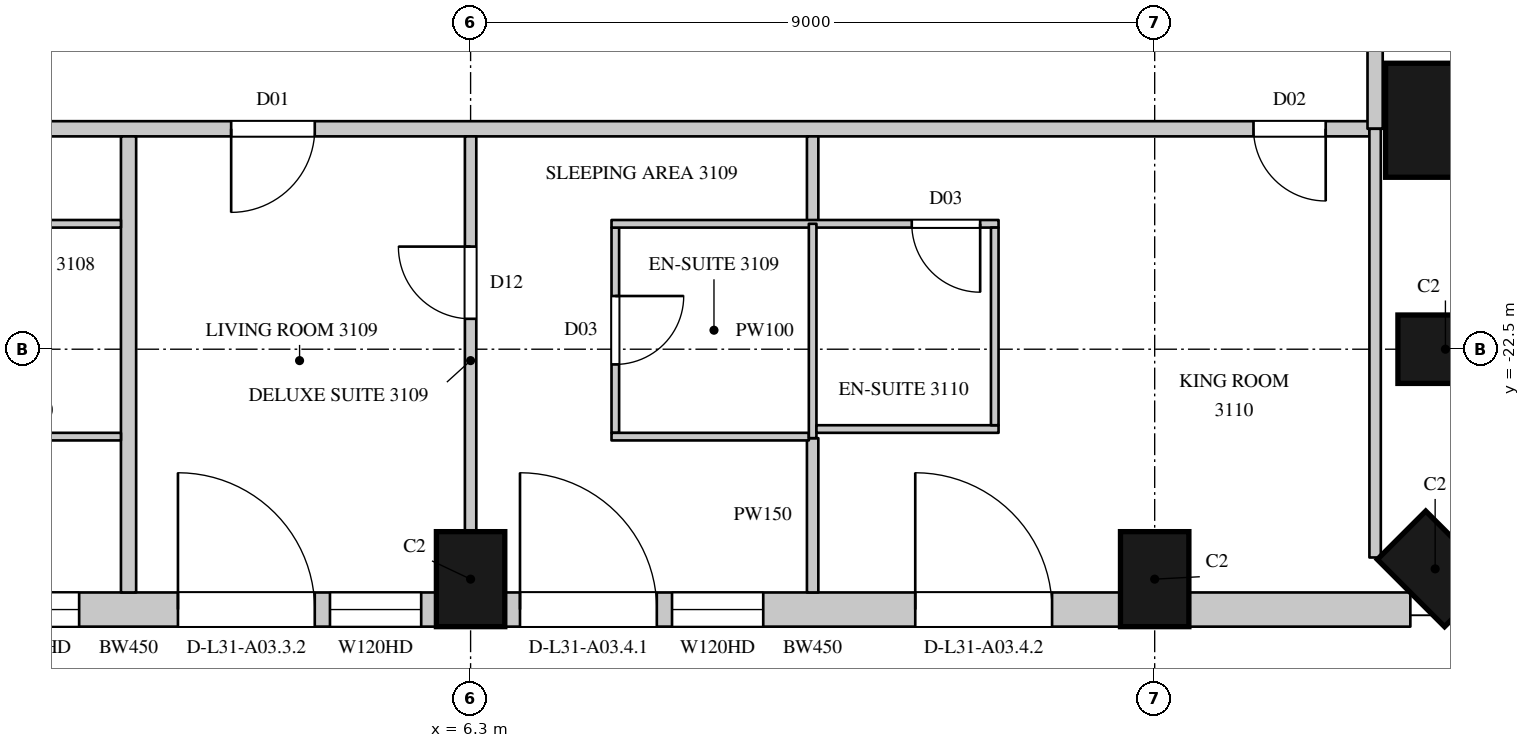
"""IFC4 building model, lengths in metres.
Left out: names, types, materials, properties, quantities, classifications, styles, units other than length and angle.
Written with IfcOpenShell. Run it as: python <this file> out.ifc"""

import sys

from ifc_helpers import new_model, si_unit, direction, frame, frame_2d, origin, origin_2d, place, context, subcontext, project, spatial, rectangle, circle, extrude, element, fill, save


model = new_model("IFC4")
c1 = context("Model", 3, precision=1e-05, world=origin(), true_north=direction((0.0, 1.0)))
c2 = subcontext(c1, "Body", "Model", "MODEL_VIEW")
j1 = project(units=[si_unit("LENGTHUNIT", "METRE"), si_unit("PLANEANGLEUNIT", "RADIAN")], contexts=[c1])
p1 = place(None, origin())
s1 = spatial("IfcSite", under=j1, at=p1, CompositionType="ELEMENT")
p2 = place(p1, origin())
s2 = spatial("IfcBuilding", under=s1, at=p2, CompositionType="ELEMENT")
p3 = place(p2, frame((0.0, 0.0, 141.9)))
s3 = spatial("IfcBuildingStorey", under=s2, at=p3, CompositionType="ELEMENT", Elevation=141.9)
for number, where, z_axis, x_axis in (
    (1, (6.3, -25.525, 0.0), (0.0, 0.0, 1.0), (1.0, 0.0, 0.0)),
    (2, (15.3, -25.525, 0.0), (0.0, 0.0, 1.0), (1.0, 0.0, 0.0)),
    (3, (18.99, -25.39, 0.0), (0.0, 0.0, 1.0), (0.707, 0.707, 0.0)),
    (4, (19.125, -22.5, 0.0), (0.0, 0.0, 1.0), (0.0, 1.0, 0.0)),
):
    element("IfcColumn", number, at=place(p3, frame(where, z_axis=z_axis, x_axis=x_axis)), inside=s3, PredefinedType="COLUMN", context=c2, shape_type="SweptSolid", body=[
        extrude(rectangle(XDim=0.9, YDim=1.25, at=origin_2d()), origin(), (0.0, 0.0, 1.0), 3.6),
    ])
p4 = place(p3, frame((19.088, -19.488, 0.0), z_axis=(0.0, 0.0, 1.0), x_axis=(1.0, 0.0, 0.0)))
e5 = element("IfcColumn", 5, at=p4, inside=s3, PredefinedType="COLUMN", context=c2, shape_type="SweptSolid", body=[
    extrude(circle(Radius=0.75, at=origin_2d()), origin(), (0.0, 0.0, 1.0), 3.6),
])
p5 = place(p3, frame((-2.25, -25.925, 0.0), z_axis=(0.0, 0.0, 1.0), x_axis=(1.0, 0.0, 0.0)))
e6 = element("IfcWall", 6, at=p5, inside=s3, PredefinedType="SOLIDWALL", context=c2, shape_type="SweptSolid", body=[
    extrude(rectangle(XDim=8.1, YDim=0.45, at=frame_2d((4.05, 0.0))), origin(), (0.0, 0.0, 1.0), 3.3),
])
p6 = place(p5, frame((0.2, 0.0, 0.0)))
e7 = element("IfcOpeningElement", 7, at=p6, cuts=e6, PredefinedType="OPENING", context=c2, shape_type="SweptSolid", body=[
    extrude(rectangle(XDim=1.8, YDim=2.4, at=frame_2d((0.9, 1.2))), frame((0.0, 0.235, 0.0), z_axis=(0.0, -1.0, 0.0), x_axis=(1.0, 0.0, 0.0)), (0.0, 0.0, 1.0), 0.47),
])
p7 = place(p5, frame((2.2, 0.0, 1.05)))
e8 = element("IfcOpeningElement", 8, at=p7, cuts=e6, PredefinedType="OPENING", context=c2, shape_type="SweptSolid", body=[
    extrude(rectangle(XDim=1.2, YDim=2.0, at=frame_2d((0.6, 1.0))), frame((0.0, 0.235, 0.0), z_axis=(0.0, -1.0, 0.0), x_axis=(1.0, 0.0, 0.0)), (0.0, 0.0, 1.0), 0.47),
])
p8 = place(p5, frame((4.7, 0.0, 0.0)))
e9 = element("IfcOpeningElement", 9, at=p8, cuts=e6, PredefinedType="OPENING", context=c2, shape_type="SweptSolid", body=[
    extrude(rectangle(XDim=1.8, YDim=2.4, at=frame_2d((0.9, 1.2))), frame((0.0, 0.235, 0.0), z_axis=(0.0, -1.0, 0.0), x_axis=(1.0, 0.0, 0.0)), (0.0, 0.0, 1.0), 0.47),
])
p9 = place(p5, frame((6.7, 0.0, 1.05)))
e10 = element("IfcOpeningElement", 10, at=p9, cuts=e6, PredefinedType="OPENING", context=c2, shape_type="SweptSolid", body=[
    extrude(rectangle(XDim=1.2, YDim=2.0, at=frame_2d((0.6, 1.0))), frame((0.0, 0.235, 0.0), z_axis=(0.0, -1.0, 0.0), x_axis=(1.0, 0.0, 0.0)), (0.0, 0.0, 1.0), 0.47),
])
p10 = place(p3, frame((6.75, -25.925, 0.0), z_axis=(0.0, 0.0, 1.0), x_axis=(1.0, 0.0, 0.0)))
e11 = element("IfcWall", 11, at=p10, inside=s3, PredefinedType="SOLIDWALL", context=c2, shape_type="SweptSolid", body=[
    extrude(rectangle(XDim=8.1, YDim=0.45, at=frame_2d((4.05, 0.0))), origin(), (0.0, 0.0, 1.0), 3.3),
])
p11 = place(p10, frame((0.2, 0.0, 0.0)))
e12 = element("IfcOpeningElement", 12, at=p11, cuts=e11, PredefinedType="OPENING", context=c2, shape_type="SweptSolid", body=[
    extrude(rectangle(XDim=1.8, YDim=2.4, at=frame_2d((0.9, 1.2))), frame((0.0, 0.235, 0.0), z_axis=(0.0, -1.0, 0.0), x_axis=(1.0, 0.0, 0.0)), (0.0, 0.0, 1.0), 0.47),
])
p12 = place(p10, frame((2.2, 0.0, 1.05)))
e13 = element("IfcOpeningElement", 13, at=p12, cuts=e11, PredefinedType="OPENING", context=c2, shape_type="SweptSolid", body=[
    extrude(rectangle(XDim=1.2, YDim=2.0, at=frame_2d((0.6, 1.0))), frame((0.0, 0.235, 0.0), z_axis=(0.0, -1.0, 0.0), x_axis=(1.0, 0.0, 0.0)), (0.0, 0.0, 1.0), 0.47),
])
p13 = place(p10, frame((5.4, 0.0, 0.0)))
e14 = element("IfcOpeningElement", 14, at=p13, cuts=e11, PredefinedType="OPENING", context=c2, shape_type="SweptSolid", body=[
    extrude(rectangle(XDim=1.8, YDim=2.4, at=frame_2d((0.9, 1.2))), frame((0.0, 0.235, 0.0), z_axis=(0.0, -1.0, 0.0), x_axis=(1.0, 0.0, 0.0)), (0.0, 0.0, 1.0), 0.47),
])
p14 = place(p3, frame((15.75, -25.925, 0.0), z_axis=(0.0, 0.0, 1.0), x_axis=(1.0, 0.0, 0.0)))
e15 = element("IfcWall", 15, at=p14, inside=s3, PredefinedType="SOLIDWALL", context=c2, shape_type="SweptSolid", body=[
    extrude(rectangle(XDim=2.914, YDim=0.45, at=frame_2d((1.457, 0.0))), origin(), (0.0, 0.0, 1.0), 3.3),
])
p15 = place(p3, frame((-20.7, -19.6, 0.0), z_axis=(0.0, 0.0, 1.0), x_axis=(1.0, 0.0, 0.0)))
e16 = element("IfcWall", 16, at=p15, inside=s3, PredefinedType="PARTITIONING", context=c2, shape_type="SweptSolid", body=[
    extrude(rectangle(XDim=38.825, YDim=0.2, at=frame_2d((19.413, 0.0))), origin(), (0.0, 0.0, 1.0), 3.3),
])
p16 = place(p15, frame((3.15, 0.0, 0.0)))
e17 = element("IfcOpeningElement", 17, at=p16, cuts=e16, PredefinedType="OPENING", context=c2, shape_type="SweptSolid", body=[
    extrude(rectangle(XDim=1.1, YDim=2.4, at=frame_2d((0.55, 1.2))), frame((0.0, 0.11, 0.0), z_axis=(0.0, -1.0, 0.0), x_axis=(1.0, 0.0, 0.0)), (0.0, 0.0, 1.0), 0.22),
])
p17 = place(p15, frame((14.85, 0.0, 0.0)))
e18 = element("IfcOpeningElement", 18, at=p17, cuts=e16, PredefinedType="OPENING", context=c2, shape_type="SweptSolid", body=[
    extrude(rectangle(XDim=1.1, YDim=2.4, at=frame_2d((0.55, 1.2))), frame((0.0, 0.11, 0.0), z_axis=(0.0, -1.0, 0.0), x_axis=(1.0, 0.0, 0.0)), (0.0, 0.0, 1.0), 0.22),
])
p18 = place(p15, frame((23.85, 0.0, 0.0)))
e19 = element("IfcOpeningElement", 19, at=p18, cuts=e16, PredefinedType="OPENING", context=c2, shape_type="SweptSolid", body=[
    extrude(rectangle(XDim=1.1, YDim=2.4, at=frame_2d((0.55, 1.2))), frame((0.0, 0.11, 0.0), z_axis=(0.0, -1.0, 0.0), x_axis=(1.0, 0.0, 0.0)), (0.0, 0.0, 1.0), 0.22),
])
p19 = place(p15, frame((37.3, 0.0, 0.0)))
e20 = element("IfcOpeningElement", 20, at=p19, cuts=e16, PredefinedType="OPENING", context=c2, shape_type="SweptSolid", body=[
    extrude(rectangle(XDim=0.95, YDim=2.2, at=frame_2d((0.475, 1.1))), frame((0.0, 0.11, 0.0), z_axis=(0.0, -1.0, 0.0), x_axis=(1.0, 0.0, 0.0)), (0.0, 0.0, 1.0), 0.22),
])
p20 = place(p3, frame((18.2, -19.6, 0.0), z_axis=(0.0, 0.0, 1.0), x_axis=(0.0, 1.0, 0.0)))
e21 = element("IfcWall", 21, at=p20, inside=s3, PredefinedType="PARTITIONING", context=c2, shape_type="SweptSolid", body=[
    extrude(rectangle(XDim=14.85, YDim=0.2, at=frame_2d((7.425, 0.0))), origin(), (0.0, 0.0, 1.0), 3.3),
])
p21 = place(p20, frame((3.9, 0.0, 0.0)))
e22 = element("IfcOpeningElement", 22, at=p21, cuts=e21, PredefinedType="OPENING", context=c2, shape_type="SweptSolid", body=[
    extrude(rectangle(XDim=0.95, YDim=2.2, at=frame_2d((0.475, 1.1))), frame((0.0, 0.11, 0.0), z_axis=(0.0, -1.0, 0.0), x_axis=(1.0, 0.0, 0.0)), (0.0, 0.0, 1.0), 0.22),
])
p22 = place(p20, frame((13.5, 0.0, 0.0)))
e23 = element("IfcOpeningElement", 23, at=p22, cuts=e21, PredefinedType="OPENING", context=c2, shape_type="SweptSolid", body=[
    extrude(rectangle(XDim=0.95, YDim=2.2, at=frame_2d((0.475, 1.1))), frame((0.0, 0.11, 0.0), z_axis=(0.0, -1.0, 0.0), x_axis=(1.0, 0.0, 0.0)), (0.0, 0.0, 1.0), 0.22),
])
p23 = place(p3, frame((6.3, -24.9, 0.0), z_axis=(0.0, 0.0, 1.0), x_axis=(0.0, 1.0, 0.0)))
e24 = element("IfcWall", 24, at=p23, inside=s3, PredefinedType="PARTITIONING", context=c2, shape_type="SweptSolid", body=[
    extrude(rectangle(XDim=5.2, YDim=0.15, at=frame_2d((2.6, 0.0))), origin(), (0.0, 0.0, 1.0), 2.75),
])
p24 = place(p23, frame((2.8, 0.0, 0.0)))
e25 = element("IfcOpeningElement", 25, at=p24, cuts=e24, PredefinedType="OPENING", context=c2, shape_type="SweptSolid", body=[
    extrude(rectangle(XDim=0.95, YDim=2.2, at=frame_2d((0.475, 1.1))), frame((0.0, 0.085, 0.0), z_axis=(0.0, -1.0, 0.0), x_axis=(1.0, 0.0, 0.0)), (0.0, 0.0, 1.0), 0.17),
])
p25 = place(p3, frame((10.8, -25.7, 0.0), z_axis=(0.0, 0.0, 1.0), x_axis=(0.0, 1.0, 0.0)))
e26 = element("IfcWall", 26, at=p25, inside=s3, PredefinedType="PARTITIONING", context=c2, shape_type="SweptSolid", body=[
    extrude(rectangle(XDim=2.03, YDim=0.15, at=frame_2d((1.015, 0.0))), origin(), (0.0, 0.0, 1.0), 3.3),
])
p26 = place(p3, frame((10.8, -20.85, 0.0), z_axis=(0.0, 0.0, 1.0), x_axis=(0.0, 1.0, 0.0)))
e27 = element("IfcWall", 27, at=p26, inside=s3, PredefinedType="PARTITIONING", context=c2, shape_type="SweptSolid", body=[
    extrude(rectangle(XDim=1.15, YDim=0.15, at=frame_2d((0.575, 0.0))), origin(), (0.0, 0.0, 1.0), 3.3),
])
p27 = place(p3, frame((18.2, -25.24, 0.0), z_axis=(0.0, 0.0, 1.0), x_axis=(0.0, 1.0, 0.0)))
e28 = element("IfcWall", 28, at=p27, inside=s3, PredefinedType="PARTITIONING", context=c2, shape_type="SweptSolid", body=[
    extrude(rectangle(XDim=5.64, YDim=0.15, at=frame_2d((2.82, 0.0))), origin(), (0.0, 0.0, 1.0), 3.3),
])
p28 = place(p3, frame((1.8, -25.7, 0.0), z_axis=(0.0, 0.0, 1.0), x_axis=(0.0, 1.0, 0.0)))
e29 = element("IfcWall", 29, at=p28, inside=s3, PredefinedType="PARTITIONING", context=c2, shape_type="SweptSolid", body=[
    extrude(rectangle(XDim=6.0, YDim=0.2, at=frame_2d((3.0, 0.0))), origin(), (0.0, 0.0, 1.0), 3.3),
])
for number, where, z_axis, x_axis in (
    (30, (-0.846, -23.65, 0.0), (0.0, 0.0, 1.0), (1.0, 0.0, 0.0)),
    (31, (-0.846, -20.85, 0.0), (0.0, 0.0, 1.0), (1.0, 0.0, 0.0)),
):
    element("IfcWall", number, at=place(p3, frame(where, z_axis=z_axis, x_axis=x_axis)), inside=s3, PredefinedType="PARTITIONING", context=c2, shape_type="SweptSolid", body=[
        extrude(rectangle(XDim=2.546, YDim=0.1, at=frame_2d((1.273, 0.0))), origin(), (0.0, 0.0, 1.0), 3.3),
    ])
p29 = place(p3, frame((8.204, -23.6, 0.0), z_axis=(0.0, 0.0, 1.0), x_axis=(0.0, 1.0, 0.0)))
e32 = element("IfcWall", 32, at=p29, inside=s3, PredefinedType="PARTITIONING", context=c2, shape_type="SweptSolid", body=[
    extrude(rectangle(XDim=2.7, YDim=0.1, at=frame_2d((1.35, 0.0))), origin(), (0.0, 0.0, 1.0), 3.3),
])
p30 = place(p29, frame((0.9, 0.0, 0.0)))
e33 = element("IfcOpeningElement", 33, at=p30, cuts=e32, PredefinedType="OPENING", context=c2, shape_type="SweptSolid", body=[
    extrude(rectangle(XDim=0.9, YDim=2.2, at=frame_2d((0.45, 1.1))), frame((0.0, 0.06, 0.0), z_axis=(0.0, -1.0, 0.0), x_axis=(1.0, 0.0, 0.0)), (0.0, 0.0, 1.0), 0.12),
])
p31 = place(p3, frame((8.154, -23.65, 0.0), z_axis=(0.0, 0.0, 1.0), x_axis=(1.0, 0.0, 0.0)))
e34 = element("IfcWall", 34, at=p31, inside=s3, PredefinedType="PARTITIONING", context=c2, shape_type="SweptSolid", body=[
    extrude(rectangle(XDim=2.596, YDim=0.1, at=frame_2d((1.298, 0.0))), origin(), (0.0, 0.0, 1.0), 3.3),
])
p32 = place(p3, frame((8.154, -20.85, 0.0), z_axis=(0.0, 0.0, 1.0), x_axis=(1.0, 0.0, 0.0)))
e35 = element("IfcWall", 35, at=p32, inside=s3, PredefinedType="PARTITIONING", context=c2, shape_type="SweptSolid", body=[
    extrude(rectangle(XDim=5.092, YDim=0.1, at=frame_2d((2.546, 0.0))), origin(), (0.0, 0.0, 1.0), 3.3),
])
p33 = place(p32, frame((3.95, 0.0, 0.0)))
e36 = element("IfcOpeningElement", 36, at=p33, cuts=e35, PredefinedType="OPENING", context=c2, shape_type="SweptSolid", body=[
    extrude(rectangle(XDim=0.9, YDim=2.2, at=frame_2d((0.45, 1.1))), frame((0.0, 0.06, 0.0), z_axis=(0.0, -1.0, 0.0), x_axis=(1.0, 0.0, 0.0)), (0.0, 0.0, 1.0), 0.12),
])
p34 = place(p3, frame((10.8, -23.67, 0.0), z_axis=(0.0, 0.0, 1.0), x_axis=(0.0, 1.0, 0.0)))
e37 = element("IfcWall", 37, at=p34, inside=s3, PredefinedType="PARTITIONING", context=c2, shape_type="SweptSolid", body=[
    extrude(rectangle(XDim=2.82, YDim=0.1, at=frame_2d((1.41, 0.0))), origin(), (0.0, 0.0, 1.0), 3.3),
])
p35 = place(p3, frame((10.85, -23.55, 0.0), z_axis=(0.0, 0.0, 1.0), x_axis=(1.0, 0.0, 0.0)))
e38 = element("IfcWall", 38, at=p35, inside=s3, PredefinedType="PARTITIONING", context=c2, shape_type="SweptSolid", body=[
    extrude(rectangle(XDim=2.396, YDim=0.1, at=frame_2d((1.198, 0.0))), origin(), (0.0, 0.0, 1.0), 3.3),
])
p36 = place(p3, frame((13.196, -23.5, 0.0), z_axis=(0.0, 0.0, 1.0), x_axis=(0.0, 1.0, 0.0)))
e39 = element("IfcWall", 39, at=p36, inside=s3, PredefinedType="PARTITIONING", context=c2, shape_type="SweptSolid", body=[
    extrude(rectangle(XDim=2.6, YDim=0.1, at=frame_2d((1.3, 0.0))), origin(), (0.0, 0.0, 1.0), 3.3),
])
p37 = place(p7, origin())
e40 = element("IfcWindow", 40, at=p37, inside=s3, PartitioningType="SINGLE_PANEL", PredefinedType="WINDOW", context=c2, shape_type="SweptSolid", body=[
    extrude(rectangle(XDim=1.2, YDim=2.0, at=frame_2d((0.6, 1.0))), frame((0.0, 0.135, 0.0), z_axis=(0.0, -1.0, 0.0), x_axis=(1.0, 0.0, 0.0)), (0.0, 0.0, 1.0), 0.06),
])
fill(e8, e40)
p38 = place(p8, origin())
e41 = element("IfcDoor", 41, at=p38, inside=s3, OperationType="SLIDING_TO_LEFT", PredefinedType="DOOR", context=c2, shape_type="SweptSolid", body=[
    extrude(rectangle(XDim=1.8, YDim=2.4, at=frame_2d((0.9, 1.2))), frame((0.0, 0.13, 0.0), z_axis=(0.0, -1.0, 0.0), x_axis=(1.0, 0.0, 0.0)), (0.0, 0.0, 1.0), 0.05),
])
fill(e9, e41)
p39 = place(p9, origin())
e42 = element("IfcWindow", 42, at=p39, inside=s3, PartitioningType="SINGLE_PANEL", PredefinedType="WINDOW", context=c2, shape_type="SweptSolid", body=[
    extrude(rectangle(XDim=1.2, YDim=2.0, at=frame_2d((0.6, 1.0))), frame((0.0, 0.135, 0.0), z_axis=(0.0, -1.0, 0.0), x_axis=(1.0, 0.0, 0.0)), (0.0, 0.0, 1.0), 0.06),
])
fill(e10, e42)
p40 = place(p11, origin())
e43 = element("IfcDoor", 43, at=p40, inside=s3, OperationType="SLIDING_TO_LEFT", PredefinedType="DOOR", context=c2, shape_type="SweptSolid", body=[
    extrude(rectangle(XDim=1.8, YDim=2.4, at=frame_2d((0.9, 1.2))), frame((0.0, 0.13, 0.0), z_axis=(0.0, -1.0, 0.0), x_axis=(1.0, 0.0, 0.0)), (0.0, 0.0, 1.0), 0.05),
])
fill(e12, e43)
p41 = place(p12, origin())
e44 = element("IfcWindow", 44, at=p41, inside=s3, PartitioningType="SINGLE_PANEL", PredefinedType="WINDOW", context=c2, shape_type="SweptSolid", body=[
    extrude(rectangle(XDim=1.2, YDim=2.0, at=frame_2d((0.6, 1.0))), frame((0.0, 0.135, 0.0), z_axis=(0.0, -1.0, 0.0), x_axis=(1.0, 0.0, 0.0)), (0.0, 0.0, 1.0), 0.06),
])
fill(e13, e44)
p42 = place(p13, origin())
e45 = element("IfcDoor", 45, at=p42, inside=s3, OperationType="SLIDING_TO_LEFT", PredefinedType="DOOR", context=c2, shape_type="SweptSolid", body=[
    extrude(rectangle(XDim=1.8, YDim=2.4, at=frame_2d((0.9, 1.2))), frame((0.0, 0.13, 0.0), z_axis=(0.0, -1.0, 0.0), x_axis=(1.0, 0.0, 0.0)), (0.0, 0.0, 1.0), 0.05),
])
fill(e14, e45)
p43 = place(p18, origin())
e46 = element("IfcDoor", 46, at=p43, inside=s3, OperationType="SINGLE_SWING_RIGHT", PredefinedType="DOOR", context=c2, shape_type="SweptSolid", body=[
    extrude(rectangle(XDim=1.1, YDim=2.4, at=frame_2d((0.55, 1.2))), frame((0.0, 0.025, 0.0), z_axis=(0.0, -1.0, 0.0), x_axis=(1.0, 0.0, 0.0)), (0.0, 0.0, 1.0), 0.05),
])
fill(e19, e46)
p44 = place(p24, origin())
e47 = element("IfcDoor", 47, at=p44, inside=s3, OperationType="SINGLE_SWING_RIGHT", PredefinedType="DOOR", context=c2, shape_type="SweptSolid", body=[
    extrude(rectangle(XDim=0.95, YDim=2.2, at=frame_2d((0.475, 1.1))), frame((0.0, 0.025, 0.0), z_axis=(0.0, -1.0, 0.0), x_axis=(1.0, 0.0, 0.0)), (0.0, 0.0, 1.0), 0.05),
])
fill(e25, e47)
p45 = place(p30, origin())
e48 = element("IfcDoor", 48, at=p45, inside=s3, OperationType="SINGLE_SWING_LEFT", PredefinedType="DOOR", context=c2, shape_type="SweptSolid", body=[
    extrude(rectangle(XDim=0.9, YDim=2.2, at=frame_2d((0.45, 1.1))), frame((0.0, 0.025, 0.0), z_axis=(0.0, -1.0, 0.0), x_axis=(1.0, 0.0, 0.0)), (0.0, 0.0, 1.0), 0.05),
])
fill(e33, e48)
p46 = place(p19, origin())
e49 = element("IfcDoor", 49, at=p46, inside=s3, OperationType="SINGLE_SWING_LEFT", PredefinedType="DOOR", context=c2, shape_type="SweptSolid", body=[
    extrude(rectangle(XDim=0.95, YDim=2.2, at=frame_2d((0.475, 1.1))), frame((0.0, 0.025, 0.0), z_axis=(0.0, -1.0, 0.0), x_axis=(1.0, 0.0, 0.0)), (0.0, 0.0, 1.0), 0.05),
])
fill(e20, e49)
p47 = place(p33, origin())
e50 = element("IfcDoor", 50, at=p47, inside=s3, OperationType="SINGLE_SWING_LEFT", PredefinedType="DOOR", context=c2, shape_type="SweptSolid", body=[
    extrude(rectangle(XDim=0.9, YDim=2.2, at=frame_2d((0.45, 1.1))), frame((0.0, 0.025, 0.0), z_axis=(0.0, -1.0, 0.0), x_axis=(1.0, 0.0, 0.0)), (0.0, 0.0, 1.0), 0.05),
])
fill(e36, e50)
save(model, sys.argv[1])
